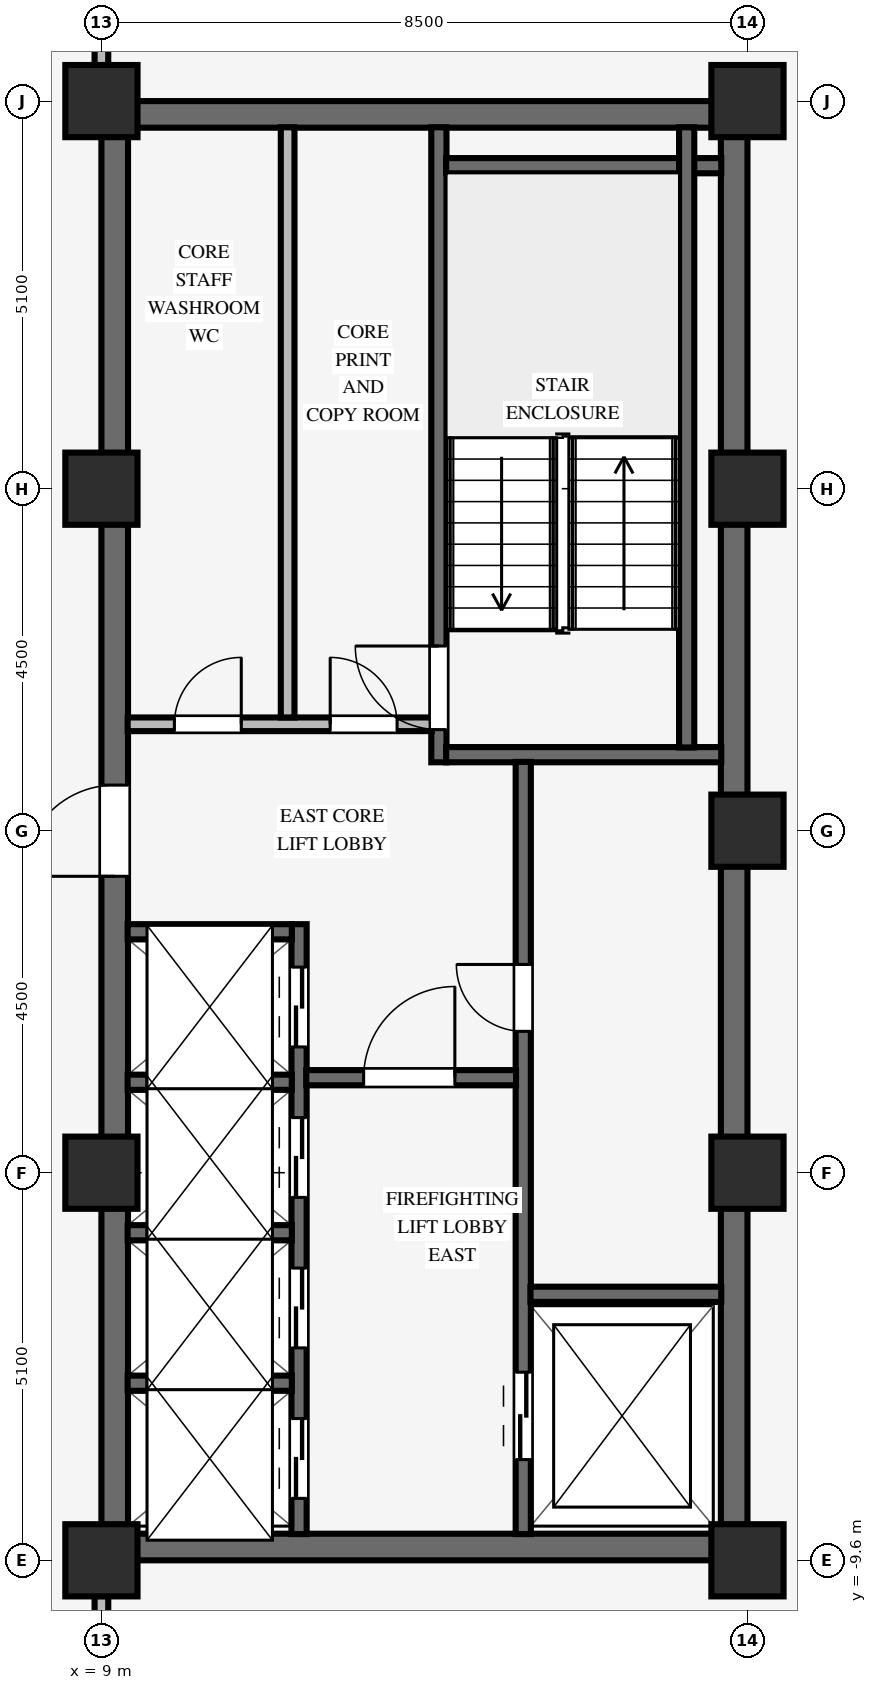
"""IFC4 building model, lengths in metres.
Left out: names, types, materials, properties, quantities, classifications, styles, units other than length and angle.
Written with IfcOpenShell. Run it as: python <this file> out.ifc"""

import sys

from ifc_helpers import new_model, si_unit, direction, frame, frame_2d, origin, origin_2d, place, context, subcontext, project, spatial, rectangle, extrude, source, transform, mapped, element, fill, save


model = new_model("IFC4")
c1 = context("Model", 3, precision=1e-05, world=origin(), true_north=direction((0.0, 1.0)))
c2 = subcontext(c1, "Body", "Model", "MODEL_VIEW")
j1 = project(units=[si_unit("LENGTHUNIT", "METRE"), si_unit("PLANEANGLEUNIT", "RADIAN")], contexts=[c1])
p1 = place(None, origin())
s1 = spatial("IfcSite", under=j1, at=p1, CompositionType="ELEMENT")
p2 = place(p1, origin())
s2 = spatial("IfcBuilding", under=s1, at=p2, CompositionType="ELEMENT")
p3 = place(p2, frame((0.0, 0.0, 220.1)))
s3 = spatial("IfcBuildingStorey", under=s2, at=p3, CompositionType="ELEMENT", Elevation=220.1)
for number, where, z_axis, x_axis in (
    (1, (9.0, -9.425, 0.0), (0.0, 0.0, 1.0), (1.0, 0.0, 0.0)),
    (2, (9.0, 9.425, 0.0), (0.0, 0.0, 1.0), (1.0, 0.0, 0.0)),
):
    element("IfcWall", number, at=place(p3, frame(where, z_axis=z_axis, x_axis=x_axis)), inside=s3, PredefinedType="SHEAR", context=c2, shape_type="SweptSolid", body=[
        extrude(rectangle(XDim=8.5, YDim=0.35, at=frame_2d((4.25, 0.0))), origin(), (0.0, 0.0, 1.0), 3.37),
    ])
p4 = place(p3, frame((9.175, -9.255, 0.0), z_axis=(0.0, 0.0, 1.0), x_axis=(0.0, 1.0, 0.0)))
e3 = element("IfcWall", 3, at=p4, inside=s3, PredefinedType="SHEAR", context=c2, shape_type="SweptSolid", body=[
    extrude(rectangle(XDim=18.51, YDim=0.35, at=frame_2d((9.255, 0.0))), origin(), (0.0, 0.0, 1.0), 3.37),
])
p5 = place(p4, frame((8.655, 0.0, 0.0)))
e4 = element("IfcOpeningElement", 4, at=p5, cuts=e3, PredefinedType="OPENING", context=c2, shape_type="SweptSolid", body=[
    extrude(rectangle(XDim=1.2, YDim=2.15, at=frame_2d((0.6, 1.075))), frame((0.0, 0.185, 0.0), z_axis=(0.0, -1.0, 0.0), x_axis=(1.0, 0.0, 0.0)), (0.0, 0.0, 1.0), 0.37),
])
p6 = place(p3, frame((17.325, -9.255, 0.0), z_axis=(0.0, 0.0, 1.0), x_axis=(0.0, 1.0, 0.0)))
e5 = element("IfcWall", 5, at=p6, inside=s3, PredefinedType="SHEAR", context=c2, shape_type="SweptSolid", body=[
    extrude(rectangle(XDim=18.51, YDim=0.35, at=frame_2d((9.255, 0.0))), origin(), (0.0, 0.0, 1.0), 3.37),
])
for number, where, z_axis, x_axis in (
    (6, (9.0, -9.6, 0.0), (0.0, 0.0, 1.0), (1.0, 0.0, 0.0)),
    (7, (9.0, -4.5, 0.0), (0.0, 0.0, 1.0), (1.0, 0.0, 0.0)),
    (8, (9.0, 4.5, 0.0), (0.0, 0.0, 1.0), (1.0, 0.0, 0.0)),
    (9, (9.0, 9.6, 0.0), (0.0, 0.0, 1.0), (1.0, 0.0, 0.0)),
    (10, (17.5, -9.6, 0.0), (0.0, 0.0, 1.0), (1.0, 0.0, 0.0)),
    (11, (17.5, -4.5, 0.0), (0.0, 0.0, 1.0), (1.0, 0.0, 0.0)),
    (12, (17.5, 4.5, 0.0), (0.0, 0.0, 1.0), (1.0, 0.0, 0.0)),
    (13, (17.5, 9.6, 0.0), (0.0, 0.0, 1.0), (1.0, 0.0, 0.0)),
    (14, (17.5, 0.0, 0.0), (0.0, 0.0, 1.0), (1.0, 0.0, 0.0)),
):
    element("IfcColumn", number, at=place(p3, frame(where, z_axis=z_axis, x_axis=x_axis)), inside=s3, PredefinedType="COLUMN", context=c2, shape_type="SweptSolid", body=[
        extrude(rectangle(XDim=0.95, YDim=0.95, at=origin_2d()), origin(), (0.0, 0.0, 1.0), 3.37),
    ])
p7 = place(p3, frame((13.44, 0.9, 0.0), z_axis=(0.0, 0.0, 1.0), x_axis=(0.0, 1.0, 0.0)))
e15 = element("IfcWall", 15, at=p7, inside=s3, PredefinedType="SHEAR", context=c2, shape_type="SweptSolid", body=[
    extrude(rectangle(XDim=8.355, YDim=0.2, at=frame_2d((4.177, 0.0))), origin(), (0.0, 0.0, 1.0), 3.37),
])
p8 = place(p7, frame((0.43, 0.0, 0.0)))
e16 = element("IfcOpeningElement", 16, at=p8, cuts=e15, PredefinedType="OPENING", context=c2, shape_type="SweptSolid", body=[
    extrude(rectangle(XDim=1.1, YDim=2.15, at=frame_2d((0.55, 1.075))), frame((0.0, 0.11, 0.0), z_axis=(0.0, -1.0, 0.0), x_axis=(1.0, 0.0, 0.0)), (0.0, 0.0, 1.0), 0.22),
])
for number, where, z_axis, x_axis in (
    (17, (13.535, 1.0, 0.0), (0.0, 0.0, 1.0), (1.0, 0.0, 0.0)),
    (18, (13.535, 8.75, 0.0), (0.0, 0.0, 1.0), (1.0, 0.0, 0.0)),
):
    element("IfcWall", number, at=place(p3, frame(where, z_axis=z_axis, x_axis=x_axis)), inside=s3, PredefinedType="SHEAR", context=c2, shape_type="SweptSolid", body=[
        extrude(rectangle(XDim=3.62, YDim=0.2, at=frame_2d((1.81, 0.0))), origin(), (0.0, 0.0, 1.0), 3.37),
    ])
p9 = place(p3, frame((16.7, 1.095, 0.0), z_axis=(0.0, 0.0, 1.0), x_axis=(0.0, 1.0, 0.0)))
e19 = element("IfcWall", 19, at=p9, inside=s3, PredefinedType="SHEAR", context=c2, shape_type="SweptSolid", body=[
    extrude(rectangle(XDim=8.16, YDim=0.2, at=frame_2d((4.08, 0.0))), origin(), (0.0, 0.0, 1.0), 3.37),
])
p10 = place(p3, frame((14.55, -9.255, 0.0), z_axis=(0.0, 0.0, 1.0), x_axis=(0.0, 1.0, 0.0)))
e20 = element("IfcWall", 20, at=p10, inside=s3, PredefinedType="SHEAR", context=c2, shape_type="SweptSolid", body=[
    extrude(rectangle(XDim=10.16, YDim=0.2, at=frame_2d((5.08, 0.0))), origin(), (0.0, 0.0, 1.0), 3.37),
])
p11 = place(p10, frame((6.615, 0.0, 0.0)))
e21 = element("IfcOpeningElement", 21, at=p11, cuts=e20, PredefinedType="OPENING", context=c2, shape_type="SweptSolid", body=[
    extrude(rectangle(XDim=0.88, YDim=2.1, at=frame_2d((0.44, 1.05))), frame((0.0, 0.11, 0.0), z_axis=(0.0, -1.0, 0.0), x_axis=(1.0, 0.0, 0.0)), (0.0, 0.0, 1.0), 0.22),
])
p12 = place(p10, frame((0.98, 0.0, 0.0)))
e22 = element("IfcOpeningElement", 22, at=p12, cuts=e20, PredefinedType="OPENING", context=c2, shape_type="SweptSolid", body=[
    extrude(rectangle(XDim=1.15, YDim=2.15, at=frame_2d((0.575, 1.075))), frame((0.0, 0.11, 0.0), z_axis=(0.0, -1.0, 0.0), x_axis=(1.0, 0.0, 0.0)), (0.0, 0.0, 1.0), 0.22),
])
p13 = place(p3, frame((14.645, -6.1, 0.0), z_axis=(0.0, 0.0, 1.0), x_axis=(1.0, 0.0, 0.0)))
e23 = element("IfcWall", 23, at=p13, inside=s3, PredefinedType="SHEAR", context=c2, shape_type="SweptSolid", body=[
    extrude(rectangle(XDim=2.51, YDim=0.2, at=frame_2d((1.255, 0.0))), origin(), (0.0, 0.0, 1.0), 3.37),
])
p14 = place(p3, frame((11.6, -9.255, 0.0), z_axis=(0.0, 0.0, 1.0), x_axis=(0.0, 1.0, 0.0)))
e24 = element("IfcWall", 24, at=p14, inside=s3, PredefinedType="SHEAR", context=c2, shape_type="SweptSolid", body=[
    extrude(rectangle(XDim=8.025, YDim=0.2, at=frame_2d((4.012, 0.0))), origin(), (0.0, 0.0, 1.0), 3.37),
])
p15 = place(p14, frame((0.47, 0.0, 0.0)))
e25 = element("IfcOpeningElement", 25, at=p15, cuts=e24, PredefinedType="OPENING", context=c2, shape_type="SweptSolid", body=[
    extrude(rectangle(XDim=1.05, YDim=2.15, at=frame_2d((0.525, 1.075))), frame((0.0, 0.11, 0.0), z_axis=(0.0, -1.0, 0.0), x_axis=(1.0, 0.0, 0.0)), (0.0, 0.0, 1.0), 0.22),
])
p16 = place(p14, frame((2.45, 0.0, 0.0)))
e26 = element("IfcOpeningElement", 26, at=p16, cuts=e24, PredefinedType="OPENING", context=c2, shape_type="SweptSolid", body=[
    extrude(rectangle(XDim=1.05, YDim=2.15, at=frame_2d((0.525, 1.075))), frame((0.0, 0.11, 0.0), z_axis=(0.0, -1.0, 0.0), x_axis=(1.0, 0.0, 0.0)), (0.0, 0.0, 1.0), 0.22),
])
p17 = place(p14, frame((4.43, 0.0, 0.0)))
e27 = element("IfcOpeningElement", 27, at=p17, cuts=e24, PredefinedType="OPENING", context=c2, shape_type="SweptSolid", body=[
    extrude(rectangle(XDim=1.05, YDim=2.15, at=frame_2d((0.525, 1.075))), frame((0.0, 0.11, 0.0), z_axis=(0.0, -1.0, 0.0), x_axis=(1.0, 0.0, 0.0)), (0.0, 0.0, 1.0), 0.22),
])
p18 = place(p14, frame((6.41, 0.0, 0.0)))
e28 = element("IfcOpeningElement", 28, at=p18, cuts=e24, PredefinedType="OPENING", context=c2, shape_type="SweptSolid", body=[
    extrude(rectangle(XDim=1.05, YDim=2.15, at=frame_2d((0.525, 1.075))), frame((0.0, 0.11, 0.0), z_axis=(0.0, -1.0, 0.0), x_axis=(1.0, 0.0, 0.0)), (0.0, 0.0, 1.0), 0.22),
])
p19 = place(p3, frame((11.695, -3.25, 0.0), z_axis=(0.0, 0.0, 1.0), x_axis=(1.0, 0.0, 0.0)))
e29 = element("IfcWall", 29, at=p19, inside=s3, PredefinedType="SHEAR", context=c2, shape_type="SweptSolid", body=[
    extrude(rectangle(XDim=2.76, YDim=0.2, at=frame_2d((1.38, 0.0))), origin(), (0.0, 0.0, 1.0), 3.37),
])
p20 = place(p19, frame((0.755, 0.0, 0.0)))
e30 = element("IfcOpeningElement", 30, at=p20, cuts=e29, PredefinedType="OPENING", context=c2, shape_type="SweptSolid", body=[
    extrude(rectangle(XDim=1.2, YDim=2.15, at=frame_2d((0.6, 1.075))), frame((0.0, 0.11, 0.0), z_axis=(0.0, -1.0, 0.0), x_axis=(1.0, 0.0, 0.0)), (0.0, 0.0, 1.0), 0.22),
])
for number, where, z_axis, x_axis in (
    (31, (9.345, -7.27, 0.0), (0.0, 0.0, 1.0), (1.0, 0.0, 0.0)),
    (32, (9.345, -5.29, 0.0), (0.0, 0.0, 1.0), (1.0, 0.0, 0.0)),
    (33, (9.345, -3.31, 0.0), (0.0, 0.0, 1.0), (1.0, 0.0, 0.0)),
    (34, (9.345, -1.33, 0.0), (0.0, 0.0, 1.0), (1.0, 0.0, 0.0)),
):
    element("IfcWall", number, at=place(p3, frame(where, z_axis=z_axis, x_axis=x_axis)), inside=s3, PredefinedType="SHEAR", context=c2, shape_type="SweptSolid", body=[
        extrude(rectangle(XDim=2.16, YDim=0.2, at=frame_2d((1.08, 0.0))), origin(), (0.0, 0.0, 1.0), 3.37),
    ])
p21 = place(p3, frame((9.345, 1.4, 0.0), z_axis=(0.0, 0.0, 1.0), x_axis=(1.0, 0.0, 0.0)))
e35 = element("IfcWall", 35, at=p21, inside=s3, PredefinedType="PARTITIONING", context=c2, shape_type="SweptSolid", body=[
    extrude(rectangle(XDim=4.0, YDim=0.18, at=frame_2d((2.0, 0.0))), origin(), (0.0, 0.0, 1.0), 3.36),
])
p22 = place(p21, frame((0.615, 0.0, 0.0)))
e36 = element("IfcOpeningElement", 36, at=p22, cuts=e35, PredefinedType="OPENING", context=c2, shape_type="SweptSolid", body=[
    extrude(rectangle(XDim=0.88, YDim=2.1, at=frame_2d((0.44, 1.05))), frame((0.0, 0.1, 0.0), z_axis=(0.0, -1.0, 0.0), x_axis=(1.0, 0.0, 0.0)), (0.0, 0.0, 1.0), 0.2),
])
p23 = place(p21, frame((2.665, 0.0, 0.0)))
e37 = element("IfcOpeningElement", 37, at=p23, cuts=e35, PredefinedType="OPENING", context=c2, shape_type="SweptSolid", body=[
    extrude(rectangle(XDim=0.88, YDim=2.1, at=frame_2d((0.44, 1.05))), frame((0.0, 0.1, 0.0), z_axis=(0.0, -1.0, 0.0), x_axis=(1.0, 0.0, 0.0)), (0.0, 0.0, 1.0), 0.2),
])
p24 = place(p3, frame((11.45, 1.49, 0.0), z_axis=(0.0, 0.0, 1.0), x_axis=(0.0, 1.0, 0.0)))
e38 = element("IfcWall", 38, at=p24, inside=s3, PredefinedType="PARTITIONING", context=c2, shape_type="SweptSolid", body=[
    extrude(rectangle(XDim=7.765, YDim=0.18, at=frame_2d((3.882, 0.0))), origin(), (0.0, 0.0, 1.0), 3.36),
])
for number, where, z_axis, x_axis in (
    (39, (9.0, -15.814, 0.0), (0.0, 0.0, 1.0), (0.0, 1.0, 0.0)),
    (40, (9.0, 10.071, 0.0), (0.0, 0.0, 1.0), (0.0, 1.0, 0.0)),
):
    element("IfcWall", number, at=place(p3, frame(where, z_axis=z_axis, x_axis=x_axis)), inside=s3, PredefinedType="PARTITIONING", context=c2, shape_type="SweptSolid", body=[
        extrude(rectangle(XDim=5.743, YDim=0.18, at=frame_2d((2.872, 0.0))), origin(), (0.0, 0.0, 1.0), 2.816),
    ])
m1 = source(origin(), c2, "Body", "SweptSolid", [
    extrude(rectangle(XDim=1.1, YDim=2.15, at=frame_2d((0.55, 1.075))), frame((0.0, 0.025, 0.0), z_axis=(0.0, -1.0, 0.0), x_axis=(1.0, 0.0, 0.0)), (0.0, 0.0, 1.0), 0.05),
])
p25 = place(p8, origin())
e41 = element("IfcDoor", 41, at=p25, inside=s3, OperationType="SINGLE_SWING_RIGHT", PredefinedType="DOOR", context=c2, shape_type="MappedRepresentation", body=[
    mapped(m1, transform((0.0, 0.0, 0.0), scale=1.0)),
])
fill(e16, e41)
m2 = source(origin(), c2, "Body", "SweptSolid", [
    extrude(rectangle(XDim=0.88, YDim=2.1, at=frame_2d((0.44, 1.05))), frame((0.0, 0.025, 0.0), z_axis=(0.0, -1.0, 0.0), x_axis=(1.0, 0.0, 0.0)), (0.0, 0.0, 1.0), 0.05),
])
p26 = place(p11, origin())
e42 = element("IfcDoor", 42, at=p26, inside=s3, OperationType="SINGLE_SWING_RIGHT", PredefinedType="DOOR", context=c2, shape_type="MappedRepresentation", body=[
    mapped(m2, transform((0.0, 0.0, 0.0), scale=1.0)),
])
fill(e21, e42)
m3 = source(origin(), c2, "Body", "SweptSolid", [
    extrude(rectangle(XDim=1.2, YDim=2.15, at=frame_2d((0.6, 1.075))), frame((0.0, 0.025, 0.0), z_axis=(0.0, -1.0, 0.0), x_axis=(1.0, 0.0, 0.0)), (0.0, 0.0, 1.0), 0.05),
])
p27 = place(p20, origin())
e43 = element("IfcDoor", 43, at=p27, inside=s3, OperationType="SINGLE_SWING_RIGHT", PredefinedType="DOOR", context=c2, shape_type="MappedRepresentation", body=[
    mapped(m3, transform((0.0, 0.0, 0.0), scale=1.0)),
])
fill(e30, e43)
p28 = place(p5, origin())
e44 = element("IfcDoor", 44, at=p28, inside=s3, OperationType="SINGLE_SWING_LEFT", PredefinedType="DOOR", context=c2, shape_type="MappedRepresentation", body=[
    mapped(m3, transform((0.0, 0.0, 0.0), scale=1.0)),
])
fill(e4, e44)
p29 = place(p22, origin())
e45 = element("IfcDoor", 45, at=p29, inside=s3, OperationType="SINGLE_SWING_RIGHT", PredefinedType="DOOR", context=c2, shape_type="MappedRepresentation", body=[
    mapped(m2, transform((0.0, 0.0, 0.0), scale=1.0)),
])
fill(e36, e45)
p30 = place(p23, origin())
e46 = element("IfcDoor", 46, at=p30, inside=s3, OperationType="SINGLE_SWING_LEFT", PredefinedType="DOOR", context=c2, shape_type="MappedRepresentation", body=[
    mapped(m2, transform((0.0, 0.0, 0.0), scale=1.0)),
])
fill(e37, e46)
m4 = source(origin(), c2, "Body", "SweptSolid", [
    extrude(rectangle(XDim=1.15, YDim=2.15, at=frame_2d((0.575, 1.075))), frame((0.0, 0.025, 0.0), z_axis=(0.0, -1.0, 0.0), x_axis=(1.0, 0.0, 0.0)), (0.0, 0.0, 1.0), 0.05),
])
p31 = place(p12, origin())
e47 = element("IfcDoor", 47, at=p31, inside=s3, OperationType="DOUBLE_DOOR_SLIDING", PredefinedType="DOOR", context=c2, shape_type="MappedRepresentation", body=[
    mapped(m4, transform((0.0, 0.0, 0.0), scale=1.0)),
])
fill(e22, e47)
m5 = source(origin(), c2, "Body", "SweptSolid", [
    extrude(rectangle(XDim=1.05, YDim=2.15, at=frame_2d((0.525, 1.075))), frame((0.0, 0.025, 0.0), z_axis=(0.0, -1.0, 0.0), x_axis=(1.0, 0.0, 0.0)), (0.0, 0.0, 1.0), 0.05),
])
p32 = place(p15, origin())
e48 = element("IfcDoor", 48, at=p32, inside=s3, OperationType="DOUBLE_DOOR_SLIDING", PredefinedType="DOOR", context=c2, shape_type="MappedRepresentation", body=[
    mapped(m5, transform((0.0, 0.0, 0.0), scale=1.0)),
])
fill(e25, e48)
p33 = place(p16, origin())
e49 = element("IfcDoor", 49, at=p33, inside=s3, OperationType="DOUBLE_DOOR_SLIDING", PredefinedType="DOOR", context=c2, shape_type="MappedRepresentation", body=[
    mapped(m5, transform((0.0, 0.0, 0.0), scale=1.0)),
])
fill(e26, e49)
p34 = place(p17, origin())
e50 = element("IfcDoor", 50, at=p34, inside=s3, OperationType="DOUBLE_DOOR_SLIDING", PredefinedType="DOOR", context=c2, shape_type="MappedRepresentation", body=[
    mapped(m5, transform((0.0, 0.0, 0.0), scale=1.0)),
])
fill(e27, e50)
p35 = place(p18, origin())
e51 = element("IfcDoor", 51, at=p35, inside=s3, OperationType="DOUBLE_DOOR_SLIDING", PredefinedType="DOOR", context=c2, shape_type="MappedRepresentation", body=[
    mapped(m5, transform((0.0, 0.0, 0.0), scale=1.0)),
])
fill(e28, e51)
save(model, sys.argv[1])
